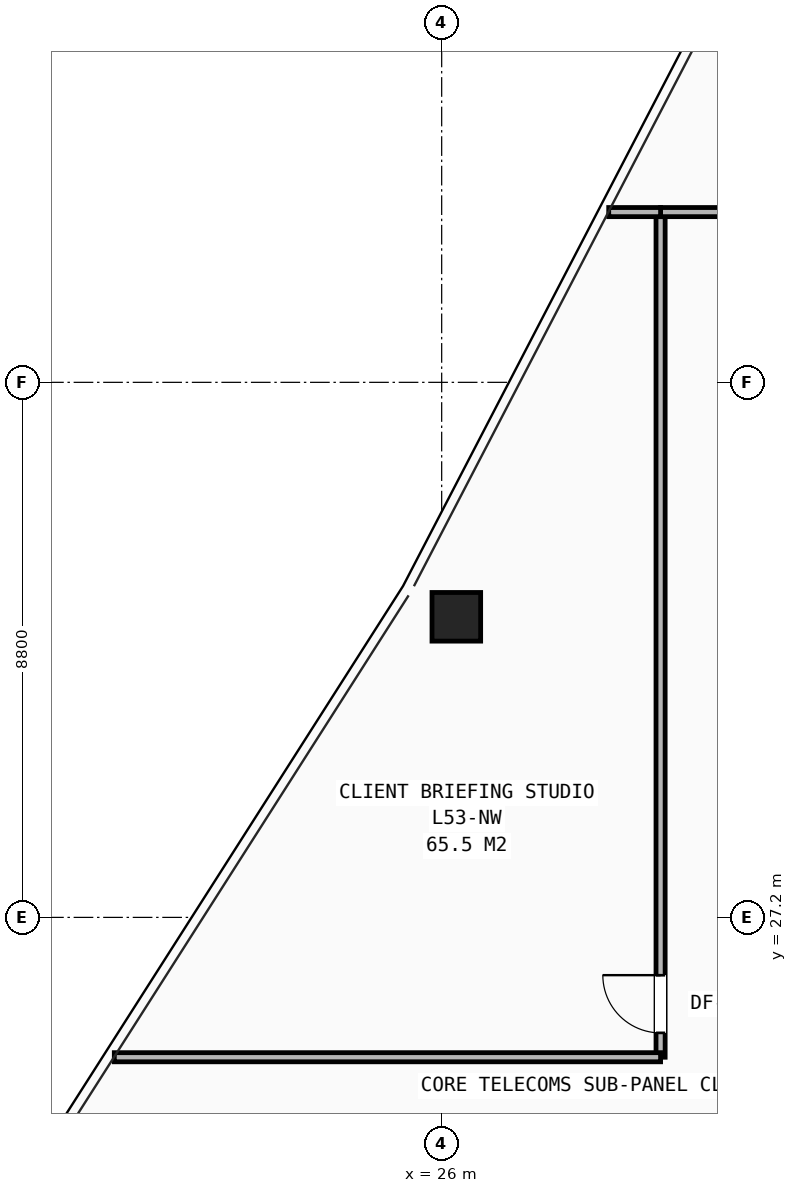
"""IFC4 building model, lengths in metres.
Left out: names, types, materials, properties, quantities, classifications, styles, units other than length and angle.
Written with IfcOpenShell. Run it as: python <this file> out.ifc"""

import sys

from ifc_helpers import new_model, si_unit, direction, frame, frame_2d, origin, origin_2d, place, context, subcontext, project, spatial, rectangle, hollow_rectangle, extrude, element, fill, save


model = new_model("IFC4")
c1 = context("Model", 3, precision=1e-05, world=origin(), true_north=direction((0.0, 1.0)))
c2 = subcontext(c1, "Body", "Model", "MODEL_VIEW")
j1 = project(units=[si_unit("LENGTHUNIT", "METRE"), si_unit("PLANEANGLEUNIT", "RADIAN")], contexts=[c1])
p1 = place(None, origin())
s1 = spatial("IfcSite", under=j1, at=p1, CompositionType="ELEMENT")
p2 = place(p1, origin())
s2 = spatial("IfcBuilding", under=s1, at=p2, CompositionType="ELEMENT")
p3 = place(p2, frame((0.0, 0.0, 186.15)))
s3 = spatial("IfcBuildingStorey", under=s2, at=p3, CompositionType="ELEMENT", Elevation=186.15)
p4 = place(p3, frame((26.241, 32.144, 0.0), z_axis=(0.0, 0.0, 1.0), x_axis=(1.0, 0.0, 0.0)))
e1 = element("IfcColumn", 1, at=p4, inside=s3, PredefinedType="COLUMN", context=c2, shape_type="SweptSolid", body=[
    extrude(hollow_rectangle(XDim=0.8, YDim=0.8, WallThickness=0.055, at=origin_2d()), origin(), (0.0, 0.0, 1.0), 3.45),
])
p5 = place(p3, frame((29.6, 24.9, 0.0), z_axis=(0.0, 0.0, 1.0), x_axis=(0.0, 1.0, 0.0)))
e2 = element("IfcWall", 2, at=p5, inside=s3, PredefinedType="PARTITIONING", context=c2, shape_type="SweptSolid", body=[
    extrude(rectangle(XDim=13.9, YDim=0.15, at=frame_2d((6.95, 0.0))), origin(), (0.0, 0.0, 1.0), 2.252),
])
p6 = place(p5, frame((0.4, 0.0, 0.0)))
e3 = element("IfcOpeningElement", 3, at=p6, cuts=e2, PredefinedType="OPENING", context=c2, shape_type="SweptSolid", body=[
    extrude(rectangle(XDim=0.95, YDim=2.1, at=frame_2d((0.475, 1.05))), frame((0.0, 0.085, 0.0), z_axis=(0.0, -1.0, 0.0), x_axis=(1.0, 0.0, 0.0)), (0.0, 0.0, 1.0), 0.17),
])
p7 = place(p3, frame((29.6, 38.8, 0.0), z_axis=(0.0, 0.0, 1.0), x_axis=(1.0, 0.0, 0.0)))
e4 = element("IfcWall", 4, at=p7, inside=s3, PredefinedType="PARTITIONING", context=c2, shape_type="SweptSolid", body=[
    extrude(rectangle(XDim=2.2, YDim=0.15, at=frame_2d((1.1, 0.0))), origin(), (0.0, 0.0, 1.0), 2.589),
])
p8 = place(p3, frame((20.616, 24.9, 0.0), z_axis=(0.0, 0.0, 1.0), x_axis=(1.0, 0.0, 0.0)))
e5 = element("IfcWall", 5, at=p8, inside=s3, PredefinedType="PARTITIONING", context=c2, shape_type="SweptSolid", body=[
    extrude(rectangle(XDim=8.984, YDim=0.15, at=frame_2d((4.492, 0.0))), origin(), (0.0, 0.0, 1.0), 2.589),
])
p9 = place(p3, frame((28.747, 38.8, 0.0), z_axis=(0.0, 0.0, 1.0), x_axis=(1.0, 0.0, 0.0)))
e6 = element("IfcWall", 6, at=p9, inside=s3, PredefinedType="PARTITIONING", context=c2, shape_type="SweptSolid", body=[
    extrude(rectangle(XDim=0.853, YDim=0.15, at=frame_2d((0.427, 0.0))), origin(), (0.0, 0.0, 1.0), 2.589),
])
p10 = place(p6, origin())
e7 = element("IfcDoor", 7, at=p10, inside=s3, OperationType="SINGLE_SWING_RIGHT", PredefinedType="DOOR", context=c2, shape_type="SweptSolid", body=[
    extrude(rectangle(XDim=0.95, YDim=2.1, at=frame_2d((0.475, 1.05))), frame((0.0, 0.025, 0.0), z_axis=(0.0, -1.0, 0.0), x_axis=(1.0, 0.0, 0.0)), (0.0, 0.0, 1.0), 0.05),
])
fill(e3, e7)
save(model, sys.argv[1])
